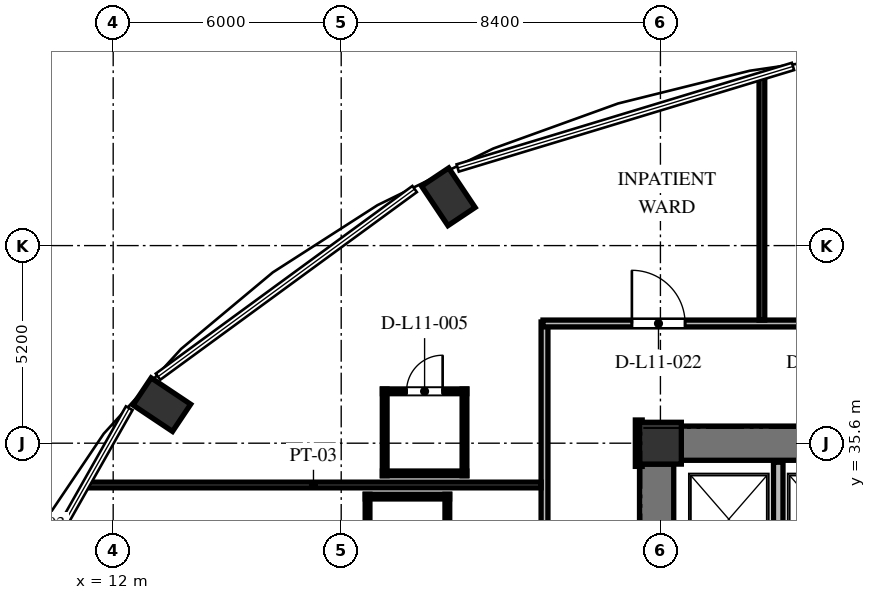
"""IFC4 building model, lengths in metres.
Left out: names, types, materials, properties, quantities, classifications, styles, units other than length and angle.
Written with IfcOpenShell. Run it as: python <this file> out.ifc"""

import sys

from ifc_helpers import new_model, si_unit, direction, frame, frame_2d, origin, origin_2d, place, context, subcontext, project, spatial, rectangle, extrude, element, fill, save


model = new_model("IFC4")
c1 = context("Model", 3, precision=1e-05, world=origin(), true_north=direction((0.0, 1.0)))
c2 = subcontext(c1, "Body", "Model", "MODEL_VIEW")
j1 = project(units=[si_unit("LENGTHUNIT", "METRE"), si_unit("PLANEANGLEUNIT", "RADIAN")], contexts=[c1])
p1 = place(None, origin())
s1 = spatial("IfcSite", under=j1, at=p1, CompositionType="ELEMENT")
p2 = place(p1, origin())
s2 = spatial("IfcBuilding", under=s1, at=p2, CompositionType="ELEMENT")
p3 = place(p2, frame((0.0, 0.0, 47.088)))
s3 = spatial("IfcBuildingStorey", under=s2, at=p3, CompositionType="ELEMENT", Elevation=47.088)
for number, where, z_axis, x_axis in (
    (1, (20.819, 42.084, 0.0), (0.0, 0.0, 1.0), (-0.556, 0.831, 0.0)),
    (2, (13.28, 36.614, 0.0), (0.0, 0.0, 1.0), (-0.831, 0.556, 0.0)),
):
    element("IfcColumn", number, at=place(p3, frame(where, z_axis=z_axis, x_axis=x_axis)), inside=s3, PredefinedType="COLUMN", context=c2, shape_type="SweptSolid", body=[
        extrude(rectangle(XDim=1.25, YDim=0.86, at=origin_2d()), origin(), (0.0, 0.0, 1.0), 3.648),
    ])
p4 = place(p3, frame((26.4, 35.6, 0.0), z_axis=(0.0, 0.0, 1.0), x_axis=(1.0, 0.0, 0.0)))
e3 = element("IfcColumn", 3, at=p4, inside=s3, PredefinedType="COLUMN", context=c2, shape_type="SweptSolid", body=[
    extrude(rectangle(XDim=1.1, YDim=1.1, at=origin_2d()), origin(), (0.0, 0.0, 1.0), 3.648),
])
p5 = place(p3, frame((26.3, 20.95, 0.0), z_axis=(0.0, 0.0, 1.0), x_axis=(0.0, 1.0, 0.0)))
e4 = element("IfcWall", 4, at=p5, inside=s3, PredefinedType="SHEAR", context=c2, shape_type="SweptSolid", body=[
    extrude(rectangle(XDim=14.1, YDim=0.9, at=frame_2d((7.05, 0.0))), origin(), (0.0, 0.0, 1.0), 3.648),
])
p6 = place(p5, frame((6.5, 0.0, 0.0)))
e5 = element("IfcOpeningElement", 5, at=p6, cuts=e4, PredefinedType="OPENING", context=c2, shape_type="SweptSolid", body=[
    extrude(rectangle(XDim=1.2, YDim=2.15, at=frame_2d((0.6, 1.075))), frame((0.0, 0.46, 0.0), z_axis=(0.0, -1.0, 0.0), x_axis=(1.0, 0.0, 0.0)), (0.0, 0.0, 1.0), 0.92),
])
p7 = place(p5, frame((9.6, 0.0, 0.0)))
e6 = element("IfcOpeningElement", 6, at=p7, cuts=e4, PredefinedType="OPENING", context=c2, shape_type="SweptSolid", body=[
    extrude(rectangle(XDim=1.3, YDim=2.2, at=frame_2d((0.65, 1.1))), frame((0.0, 0.46, 0.0), z_axis=(0.0, -1.0, 0.0), x_axis=(1.0, 0.0, 0.0)), (0.0, 0.0, 1.0), 0.92),
])
p8 = place(p5, frame((3.26, 0.0, 0.0)))
e7 = element("IfcOpeningElement", 7, at=p8, cuts=e4, PredefinedType="OPENING", context=c2, shape_type="SweptSolid", body=[
    extrude(rectangle(XDim=1.3, YDim=2.2, at=frame_2d((0.65, 1.1))), frame((0.0, 0.46, 0.0), z_axis=(0.0, -1.0, 0.0), x_axis=(1.0, 0.0, 0.0)), (0.0, 0.0, 1.0), 0.92),
])
p9 = place(p3, frame((26.95, 35.6, 0.0), z_axis=(0.0, 0.0, 1.0), x_axis=(1.0, 0.0, 0.0)))
e8 = element("IfcWall", 8, at=p9, inside=s3, PredefinedType="SHEAR", context=c2, shape_type="SweptSolid", body=[
    extrude(rectangle(XDim=5.3, YDim=0.9, at=frame_2d((2.65, 0.0))), origin(), (0.0, 0.0, 1.0), 3.648),
])
p10 = place(p3, frame((29.5, 32.42, 0.0), z_axis=(0.0, 0.0, 1.0), x_axis=(0.0, 1.0, 0.0)))
e9 = element("IfcWall", 9, at=p10, inside=s3, PredefinedType="SOLIDWALL", context=c2, shape_type="SweptSolid", body=[
    extrude(rectangle(XDim=2.68, YDim=0.25, at=frame_2d((1.34, 0.0))), origin(), (0.0, 0.0, 1.0), 3.428),
])
p11 = place(p3, frame((23.35, 29.36, 0.0), z_axis=(0.0, 0.0, 1.0), x_axis=(0.0, 1.0, 0.0)))
e10 = element("IfcWall", 10, at=p11, inside=s3, PredefinedType="PARTITIONING", context=c2, shape_type="SweptSolid", body=[
    extrude(rectangle(XDim=9.43, YDim=0.18, at=frame_2d((4.715, 0.0))), origin(), (0.0, 0.0, 1.0), 3.428),
])
p12 = place(p3, frame((23.31, 38.75, 0.0), z_axis=(0.0, 0.0, 1.0), x_axis=(1.0, 0.0, 0.0)))
e11 = element("IfcWall", 11, at=p12, inside=s3, PredefinedType="PARTITIONING", context=c2, shape_type="SweptSolid", body=[
    extrude(rectangle(XDim=29.88, YDim=0.18, at=frame_2d((14.94, 0.0))), origin(), (0.0, 0.0, 1.0), 3.053),
])
p13 = place(p12, frame((25.891, 0.0, 0.0)))
e12 = element("IfcOpeningElement", 12, at=p13, cuts=e11, PredefinedType="OPENING", context=c2, shape_type="SweptSolid", body=[
    extrude(rectangle(XDim=1.4, YDim=2.2, at=frame_2d((0.7, 1.1))), frame((0.0, 0.1, 0.0), z_axis=(0.0, -1.0, 0.0), x_axis=(1.0, 0.0, 0.0)), (0.0, 0.0, 1.0), 0.2),
])
p14 = place(p12, frame((21.135, 0.0, 0.0)))
e13 = element("IfcOpeningElement", 13, at=p14, cuts=e11, PredefinedType="OPENING", context=c2, shape_type="SweptSolid", body=[
    extrude(rectangle(XDim=1.4, YDim=2.2, at=frame_2d((0.7, 1.1))), frame((0.0, 0.1, 0.0), z_axis=(0.0, -1.0, 0.0), x_axis=(1.0, 0.0, 0.0)), (0.0, 0.0, 1.0), 0.2),
])
p15 = place(p12, frame((17.565, 0.0, 0.0)))
e14 = element("IfcOpeningElement", 14, at=p15, cuts=e11, PredefinedType="OPENING", context=c2, shape_type="SweptSolid", body=[
    extrude(rectangle(XDim=1.4, YDim=2.2, at=frame_2d((0.7, 1.1))), frame((0.0, 0.1, 0.0), z_axis=(0.0, -1.0, 0.0), x_axis=(1.0, 0.0, 0.0)), (0.0, 0.0, 1.0), 0.2),
])
p16 = place(p12, frame((12.86, 0.0, 0.0)))
e15 = element("IfcOpeningElement", 15, at=p16, cuts=e11, PredefinedType="OPENING", context=c2, shape_type="SweptSolid", body=[
    extrude(rectangle(XDim=1.4, YDim=2.2, at=frame_2d((0.7, 1.1))), frame((0.0, 0.1, 0.0), z_axis=(0.0, -1.0, 0.0), x_axis=(1.0, 0.0, 0.0)), (0.0, 0.0, 1.0), 0.2),
])
p17 = place(p12, frame((11.11, 0.0, 0.0)))
e16 = element("IfcOpeningElement", 16, at=p17, cuts=e11, PredefinedType="OPENING", context=c2, shape_type="SweptSolid", body=[
    extrude(rectangle(XDim=0.95, YDim=2.1, at=frame_2d((0.475, 1.05))), frame((0.0, 0.1, 0.0), z_axis=(0.0, -1.0, 0.0), x_axis=(1.0, 0.0, 0.0)), (0.0, 0.0, 1.0), 0.2),
])
p18 = place(p12, frame((6.845, 0.0, 0.0)))
e17 = element("IfcOpeningElement", 17, at=p18, cuts=e11, PredefinedType="OPENING", context=c2, shape_type="SweptSolid", body=[
    extrude(rectangle(XDim=1.4, YDim=2.2, at=frame_2d((0.7, 1.1))), frame((0.0, 0.1, 0.0), z_axis=(0.0, -1.0, 0.0), x_axis=(1.0, 0.0, 0.0)), (0.0, 0.0, 1.0), 0.2),
])
p19 = place(p12, frame((2.339, 0.0, 0.0)))
e18 = element("IfcOpeningElement", 18, at=p19, cuts=e11, PredefinedType="OPENING", context=c2, shape_type="SweptSolid", body=[
    extrude(rectangle(XDim=1.4, YDim=2.2, at=frame_2d((0.7, 1.1))), frame((0.0, 0.1, 0.0), z_axis=(0.0, -1.0, 0.0), x_axis=(1.0, 0.0, 0.0)), (0.0, 0.0, 1.0), 0.2),
])
p20 = place(p3, frame((25.83, 36.21, 0.0), z_axis=(0.0, 0.0, 1.0), x_axis=(0.0, -1.0, 0.0)))
e19 = element("IfcWall", 19, at=p20, inside=s3, PredefinedType="PARTITIONING", context=c2, shape_type="SweptSolid", body=[
    extrude(rectangle(XDim=1.22, YDim=0.18, at=frame_2d((0.61, 0.0))), origin(), (0.0, 0.0, 1.0), 3.428),
])
p21 = place(p3, frame((11.281, 34.5, 0.0), z_axis=(0.0, 0.0, 1.0), x_axis=(1.0, 0.0, 0.0)))
e20 = element("IfcWall", 20, at=p21, inside=s3, PredefinedType="PARTITIONING", context=c2, shape_type="SweptSolid", body=[
    extrude(rectangle(XDim=11.979, YDim=0.15, at=frame_2d((5.99, 0.0))), origin(), (0.0, 0.0, 1.0), 3.428),
])
p22 = place(p3, frame((29.07, 38.84, 0.0), z_axis=(0.0, 0.0, 1.0), x_axis=(0.0, 1.0, 0.0)))
e21 = element("IfcWall", 21, at=p22, inside=s3, PredefinedType="PARTITIONING", context=c2, shape_type="SweptSolid", body=[
    extrude(rectangle(XDim=6.414, YDim=0.15, at=frame_2d((3.207, 0.0))), origin(), (0.0, 0.0, 1.0), 3.428),
])
p23 = place(p3, frame((18.633, 34.195, 0.0), z_axis=(0.0, 0.0, 1.0), x_axis=(1.0, 0.0, 0.0)))
e22 = element("IfcWall", 22, at=p23, inside=s3, PredefinedType="PARTITIONING", context=c2, shape_type="SweptSolid", body=[
    extrude(rectangle(XDim=2.22, YDim=0.125, at=frame_2d((1.11, 0.0))), origin(), (0.0, 0.0, 1.0), 3.428),
])
for number, where, z_axis, x_axis in (
    (23, (20.793, 31.975, 0.0), (0.0, 0.0, 1.0), (0.0, 1.0, 0.0)),
    (24, (18.693, 31.975, 0.0), (0.0, 0.0, 1.0), (0.0, 1.0, 0.0)),
):
    element("IfcWall", number, at=place(p3, frame(where, z_axis=z_axis, x_axis=x_axis)), inside=s3, PredefinedType="PARTITIONING", context=c2, shape_type="SweptSolid", body=[
        extrude(rectangle(XDim=2.28, YDim=0.125, at=frame_2d((1.14, 0.0))), origin(), (0.0, 0.0, 1.0), 3.428),
    ])
p24 = place(p3, frame((19.084, 36.965, 0.0), z_axis=(0.0, 0.0, 1.0), x_axis=(1.0, 0.0, 0.0)))
e25 = element("IfcWall", 25, at=p24, inside=s3, PredefinedType="PARTITIONING", context=c2, shape_type="SweptSolid", body=[
    extrude(rectangle(XDim=2.22, YDim=0.125, at=frame_2d((1.11, 0.0))), origin(), (0.0, 0.0, 1.0), 3.428),
])
p25 = place(p24, frame((0.635, 0.0, 0.0)))
e26 = element("IfcOpeningElement", 26, at=p25, cuts=e25, PredefinedType="OPENING", context=c2, shape_type="SweptSolid", body=[
    extrude(rectangle(XDim=0.95, YDim=2.1, at=frame_2d((0.475, 1.05))), frame((0.0, 0.073, 0.0), z_axis=(0.0, -1.0, 0.0), x_axis=(1.0, 0.0, 0.0)), (0.0, 0.0, 1.0), 0.145),
])
p26 = place(p3, frame((19.084, 34.805, 0.0), z_axis=(0.0, 0.0, 1.0), x_axis=(1.0, 0.0, 0.0)))
e27 = element("IfcWall", 27, at=p26, inside=s3, PredefinedType="PARTITIONING", context=c2, shape_type="SweptSolid", body=[
    extrude(rectangle(XDim=2.22, YDim=0.125, at=frame_2d((1.11, 0.0))), origin(), (0.0, 0.0, 1.0), 3.428),
])
for number, where, z_axis, x_axis in (
    (28, (21.244, 34.745, 0.0), (0.0, 0.0, 1.0), (0.0, 1.0, 0.0)),
    (29, (19.144, 34.745, 0.0), (0.0, 0.0, 1.0), (0.0, 1.0, 0.0)),
):
    element("IfcWall", number, at=place(p3, frame(where, z_axis=z_axis, x_axis=x_axis)), inside=s3, PredefinedType="PARTITIONING", context=c2, shape_type="SweptSolid", body=[
        extrude(rectangle(XDim=2.28, YDim=0.125, at=frame_2d((1.14, 0.0))), origin(), (0.0, 0.0, 1.0), 3.428),
    ])
p27 = place(p25, origin())
e30 = element("IfcDoor", 30, at=p27, inside=s3, OperationType="SINGLE_SWING_RIGHT", PredefinedType="DOOR", context=c2, shape_type="SweptSolid", body=[
    extrude(rectangle(XDim=0.95, YDim=2.1, at=frame_2d((0.475, 1.05))), frame((0.0, 0.025, 0.0), z_axis=(0.0, -1.0, 0.0), x_axis=(1.0, 0.0, 0.0)), (0.0, 0.0, 1.0), 0.05),
])
fill(e26, e30)
p28 = place(p19, origin())
e31 = element("IfcDoor", 31, at=p28, inside=s3, OperationType="SINGLE_SWING_LEFT", PredefinedType="DOOR", context=c2, shape_type="SweptSolid", body=[
    extrude(rectangle(XDim=1.4, YDim=2.2, at=frame_2d((0.7, 1.1))), frame((0.0, 0.025, 0.0), z_axis=(0.0, -1.0, 0.0), x_axis=(1.0, 0.0, 0.0)), (0.0, 0.0, 1.0), 0.05),
])
fill(e18, e31)
save(model, sys.argv[1])
